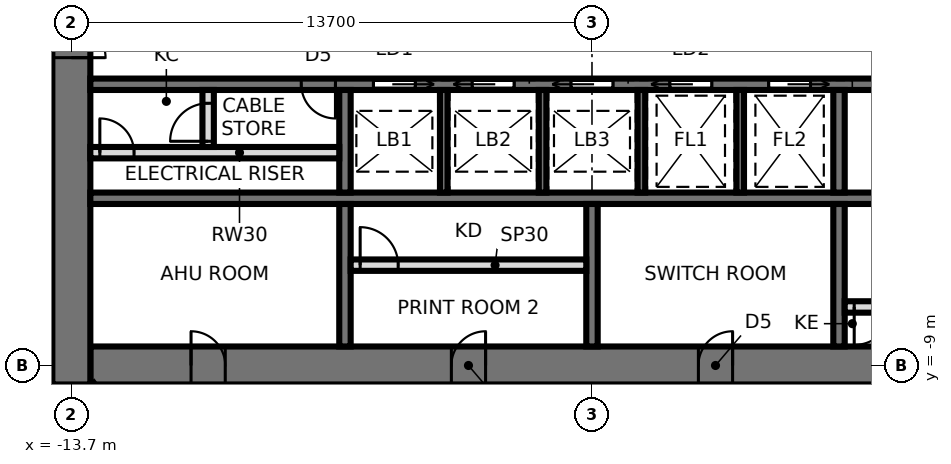
"""IFC4 building model, lengths in metres.
Left out: names, types, materials, properties, quantities, classifications, styles, units other than length and angle.
Written with IfcOpenShell. Run it as: python <this file> out.ifc"""

import sys

from ifc_helpers import new_model, si_unit, direction, frame, frame_2d, origin, place, context, subcontext, project, spatial, rectangle, extrude, element, fill, save


model = new_model("IFC4")
c1 = context("Model", 3, precision=1e-05, world=origin(), true_north=direction((0.0, 1.0)))
c2 = subcontext(c1, "Body", "Model", "MODEL_VIEW")
j1 = project(units=[si_unit("LENGTHUNIT", "METRE"), si_unit("PLANEANGLEUNIT", "RADIAN")], contexts=[c1])
p1 = place(None, origin())
s1 = spatial("IfcSite", under=j1, at=p1, CompositionType="ELEMENT")
p2 = place(p1, origin())
s2 = spatial("IfcBuilding", under=s1, at=p2, CompositionType="ELEMENT")
p3 = place(p2, frame((0.0, 0.0, 135.3)))
s3 = spatial("IfcBuildingStorey", under=s2, at=p3, CompositionType="ELEMENT", Elevation=135.3)
p4 = place(p3, frame((-13.2, -9.0, 0.0), z_axis=(0.0, 0.0, 1.0), x_axis=(1.0, 0.0, 0.0)))
e1 = element("IfcWall", 1, at=p4, inside=s3, PredefinedType="SHEAR", context=c2, shape_type="SweptSolid", body=[
    extrude(rectangle(XDim=26.4, YDim=1.0, at=frame_2d((13.2, 0.0))), origin(), (0.0, 0.0, 1.0), 3.9),
])
p5 = place(p4, frame((2.65, 0.0, 0.0)))
e2 = element("IfcOpeningElement", 2, at=p5, cuts=e1, PredefinedType="OPENING", context=c2, shape_type="SweptSolid", body=[
    extrude(rectangle(XDim=0.9, YDim=2.1, at=frame_2d((0.45, 1.05))), frame((0.0, 0.51, 0.0), z_axis=(0.0, -1.0, 0.0), x_axis=(1.0, 0.0, 0.0)), (0.0, 0.0, 1.0), 1.02),
])
p6 = place(p4, frame((9.5, 0.0, 0.0)))
e3 = element("IfcOpeningElement", 3, at=p6, cuts=e1, PredefinedType="OPENING", context=c2, shape_type="SweptSolid", body=[
    extrude(rectangle(XDim=0.9, YDim=2.1, at=frame_2d((0.45, 1.05))), frame((0.0, 0.51, 0.0), z_axis=(0.0, -1.0, 0.0), x_axis=(1.0, 0.0, 0.0)), (0.0, 0.0, 1.0), 1.02),
])
p7 = place(p4, frame((16.0, 0.0, 0.0)))
e4 = element("IfcOpeningElement", 4, at=p7, cuts=e1, PredefinedType="OPENING", context=c2, shape_type="SweptSolid", body=[
    extrude(rectangle(XDim=0.9, YDim=2.1, at=frame_2d((0.45, 1.05))), frame((0.0, 0.51, 0.0), z_axis=(0.0, -1.0, 0.0), x_axis=(1.0, 0.0, 0.0)), (0.0, 0.0, 1.0), 1.02),
])
p8 = place(p4, frame((22.85, 0.0, 0.0)))
e5 = element("IfcOpeningElement", 5, at=p8, cuts=e1, PredefinedType="OPENING", context=c2, shape_type="SweptSolid", body=[
    extrude(rectangle(XDim=0.9, YDim=2.1, at=frame_2d((0.45, 1.05))), frame((0.0, 0.51, 0.0), z_axis=(0.0, -1.0, 0.0), x_axis=(1.0, 0.0, 0.0)), (0.0, 0.0, 1.0), 1.02),
])
p9 = place(p3, frame((-13.7, 9.5, 0.0), z_axis=(0.0, 0.0, 1.0), x_axis=(0.0, -1.0, 0.0)))
e6 = element("IfcWall", 6, at=p9, inside=s3, PredefinedType="SHEAR", context=c2, shape_type="SweptSolid", body=[
    extrude(rectangle(XDim=19.0, YDim=1.0, at=frame_2d((9.5, 0.0))), origin(), (0.0, 0.0, 1.0), 3.9),
])
p10 = place(p9, frame((8.6, 0.0, 0.0)))
e7 = element("IfcOpeningElement", 7, at=p10, cuts=e6, PredefinedType="OPENING", context=c2, shape_type="SweptSolid", body=[
    extrude(rectangle(XDim=1.8, YDim=2.4, at=frame_2d((0.9, 1.2))), frame((0.0, 0.51, 0.0), z_axis=(0.0, -1.0, 0.0), x_axis=(1.0, 0.0, 0.0)), (0.0, 0.0, 1.0), 1.02),
])
p11 = place(p3, frame((-13.2, -1.6, 0.0), z_axis=(0.0, 0.0, 1.0), x_axis=(1.0, 0.0, 0.0)))
e8 = element("IfcWall", 8, at=p11, inside=s3, PredefinedType="SHEAR", context=c2, shape_type="SweptSolid", body=[
    extrude(rectangle(XDim=26.4, YDim=0.3, at=frame_2d((13.2, 0.0))), origin(), (0.0, 0.0, 1.0), 3.9),
])
p12 = place(p11, frame((25.15, 0.0, 0.0)))
e9 = element("IfcOpeningElement", 9, at=p12, cuts=e8, PredefinedType="OPENING", context=c2, shape_type="SweptSolid", body=[
    extrude(rectangle(XDim=1.0, YDim=2.1, at=frame_2d((0.5, 1.05))), frame((0.0, 0.16, 0.0), z_axis=(0.0, -1.0, 0.0), x_axis=(1.0, 0.0, 0.0)), (0.0, 0.0, 1.0), 0.32),
])
p13 = place(p11, frame((7.45, 0.0, 0.0)))
e10 = element("IfcOpeningElement", 10, at=p13, cuts=e8, PredefinedType="OPENING", context=c2, shape_type="SweptSolid", body=[
    extrude(rectangle(XDim=1.1, YDim=2.3, at=frame_2d((0.55, 1.15))), frame((0.0, 0.16, 0.0), z_axis=(0.0, -1.0, 0.0), x_axis=(1.0, 0.0, 0.0)), (0.0, 0.0, 1.0), 0.32),
])
p14 = place(p11, frame((10.05, 0.0, 0.0)))
e11 = element("IfcOpeningElement", 11, at=p14, cuts=e8, PredefinedType="OPENING", context=c2, shape_type="SweptSolid", body=[
    extrude(rectangle(XDim=1.1, YDim=2.3, at=frame_2d((0.55, 1.15))), frame((0.0, 0.16, 0.0), z_axis=(0.0, -1.0, 0.0), x_axis=(1.0, 0.0, 0.0)), (0.0, 0.0, 1.0), 0.32),
])
p15 = place(p11, frame((12.65, 0.0, 0.0)))
e12 = element("IfcOpeningElement", 12, at=p15, cuts=e8, PredefinedType="OPENING", context=c2, shape_type="SweptSolid", body=[
    extrude(rectangle(XDim=1.1, YDim=2.3, at=frame_2d((0.55, 1.15))), frame((0.0, 0.16, 0.0), z_axis=(0.0, -1.0, 0.0), x_axis=(1.0, 0.0, 0.0)), (0.0, 0.0, 1.0), 0.32),
])
p16 = place(p11, frame((15.25, 0.0, 0.0)))
e13 = element("IfcOpeningElement", 13, at=p16, cuts=e8, PredefinedType="OPENING", context=c2, shape_type="SweptSolid", body=[
    extrude(rectangle(XDim=1.1, YDim=2.3, at=frame_2d((0.55, 1.15))), frame((0.0, 0.16, 0.0), z_axis=(0.0, -1.0, 0.0), x_axis=(1.0, 0.0, 0.0)), (0.0, 0.0, 1.0), 0.32),
])
p17 = place(p11, frame((17.85, 0.0, 0.0)))
e14 = element("IfcOpeningElement", 14, at=p17, cuts=e8, PredefinedType="OPENING", context=c2, shape_type="SweptSolid", body=[
    extrude(rectangle(XDim=1.1, YDim=2.3, at=frame_2d((0.55, 1.15))), frame((0.0, 0.16, 0.0), z_axis=(0.0, -1.0, 0.0), x_axis=(1.0, 0.0, 0.0)), (0.0, 0.0, 1.0), 0.32),
])
p18 = place(p11, frame((5.55, 0.0, 0.0)))
e15 = element("IfcOpeningElement", 15, at=p18, cuts=e8, PredefinedType="OPENING", context=c2, shape_type="SweptSolid", body=[
    extrude(rectangle(XDim=0.9, YDim=2.1, at=frame_2d((0.45, 1.05))), frame((0.0, 0.16, 0.0), z_axis=(0.0, -1.0, 0.0), x_axis=(1.0, 0.0, 0.0)), (0.0, 0.0, 1.0), 0.32),
])
p19 = place(p3, frame((-13.2, -4.6, 0.0), z_axis=(0.0, 0.0, 1.0), x_axis=(1.0, 0.0, 0.0)))
e16 = element("IfcWall", 16, at=p19, inside=s3, PredefinedType="SHEAR", context=c2, shape_type="SweptSolid", body=[
    extrude(rectangle(XDim=26.4, YDim=0.3, at=frame_2d((13.2, 0.0))), origin(), (0.0, 0.0, 1.0), 3.9),
])
p20 = place(p3, frame((-6.5, -1.75, 0.0), z_axis=(0.0, 0.0, 1.0), x_axis=(0.0, -1.0, 0.0)))
e17 = element("IfcWall", 17, at=p20, inside=s3, PredefinedType="SHEAR", context=c2, shape_type="SweptSolid", body=[
    extrude(rectangle(XDim=2.7, YDim=0.3, at=frame_2d((1.35, 0.0))), origin(), (0.0, 0.0, 1.0), 3.9),
])
p21 = place(p3, frame((-6.5, -4.75, 0.0), z_axis=(0.0, 0.0, 1.0), x_axis=(0.0, -1.0, 0.0)))
e18 = element("IfcWall", 18, at=p21, inside=s3, PredefinedType="SHEAR", context=c2, shape_type="SweptSolid", body=[
    extrude(rectangle(XDim=3.75, YDim=0.3, at=frame_2d((1.875, 0.0))), origin(), (0.0, 0.0, 1.0), 3.9),
])
p22 = place(p3, frame((6.5, -1.75, 0.0), z_axis=(0.0, 0.0, 1.0), x_axis=(0.0, -1.0, 0.0)))
e19 = element("IfcWall", 19, at=p22, inside=s3, PredefinedType="SHEAR", context=c2, shape_type="SweptSolid", body=[
    extrude(rectangle(XDim=2.7, YDim=0.3, at=frame_2d((1.35, 0.0))), origin(), (0.0, 0.0, 1.0), 3.9),
])
p23 = place(p3, frame((6.5, -4.75, 0.0), z_axis=(0.0, 0.0, 1.0), x_axis=(0.0, -1.0, 0.0)))
e20 = element("IfcWall", 20, at=p23, inside=s3, PredefinedType="SHEAR", context=c2, shape_type="SweptSolid", body=[
    extrude(rectangle(XDim=3.75, YDim=0.3, at=frame_2d((1.875, 0.0))), origin(), (0.0, 0.0, 1.0), 3.9),
])
for number, where, z_axis, x_axis in (
    (21, (-3.9, -1.75, 0.0), (0.0, 0.0, 1.0), (0.0, -1.0, 0.0)),
    (22, (-1.3, -1.75, 0.0), (0.0, 0.0, 1.0), (0.0, -1.0, 0.0)),
    (23, (1.3, -1.75, 0.0), (0.0, 0.0, 1.0), (0.0, -1.0, 0.0)),
    (24, (3.9, -1.75, 0.0), (0.0, 0.0, 1.0), (0.0, -1.0, 0.0)),
):
    element("IfcWall", number, at=place(p3, frame(where, z_axis=z_axis, x_axis=x_axis)), inside=s3, PredefinedType="SHEAR", context=c2, shape_type="SweptSolid", body=[
        extrude(rectangle(XDim=2.7, YDim=0.2, at=frame_2d((1.35, 0.0))), origin(), (0.0, 0.0, 1.0), 3.9),
    ])
p24 = place(p3, frame((0.0, -4.75, 0.0), z_axis=(0.0, 0.0, 1.0), x_axis=(0.0, -1.0, 0.0)))
e25 = element("IfcWall", 25, at=p24, inside=s3, PredefinedType="SHEAR", context=c2, shape_type="SweptSolid", body=[
    extrude(rectangle(XDim=3.75, YDim=0.3, at=frame_2d((1.875, 0.0))), origin(), (0.0, 0.0, 1.0), 3.9),
])
p25 = place(p3, frame((-6.35, -6.36, 0.0), z_axis=(0.0, 0.0, 1.0), x_axis=(1.0, 0.0, 0.0)))
e26 = element("IfcWall", 26, at=p25, inside=s3, PredefinedType="PARTITIONING", context=c2, shape_type="SweptSolid", body=[
    extrude(rectangle(XDim=6.2, YDim=0.3, at=frame_2d((3.1, 0.0))), origin(), (0.0, 0.0, 1.0), 3.74),
])
p26 = place(p25, frame((0.25, 0.0, 0.0)))
e27 = element("IfcOpeningElement", 27, at=p26, cuts=e26, PredefinedType="OPENING", context=c2, shape_type="SweptSolid", body=[
    extrude(rectangle(XDim=1.0, YDim=2.4, at=frame_2d((0.5, 1.2))), frame((0.0, 0.16, 0.0), z_axis=(0.0, -1.0, 0.0), x_axis=(1.0, 0.0, 0.0)), (0.0, 0.0, 1.0), 0.32),
])
p27 = place(p3, frame((6.65, -7.46, 0.0), z_axis=(0.0, 0.0, 1.0), x_axis=(1.0, 0.0, 0.0)))
e28 = element("IfcWall", 28, at=p27, inside=s3, PredefinedType="PARTITIONING", context=c2, shape_type="SweptSolid", body=[
    extrude(rectangle(XDim=6.55, YDim=0.3, at=frame_2d((3.275, 0.0))), origin(), (0.0, 0.0, 1.0), 3.74),
])
p28 = place(p27, frame((0.25, 0.0, 0.0)))
e29 = element("IfcOpeningElement", 29, at=p28, cuts=e28, PredefinedType="OPENING", context=c2, shape_type="SweptSolid", body=[
    extrude(rectangle(XDim=1.0, YDim=2.4, at=frame_2d((0.5, 1.2))), frame((0.0, 0.16, 0.0), z_axis=(0.0, -1.0, 0.0), x_axis=(1.0, 0.0, 0.0)), (0.0, 0.0, 1.0), 0.32),
])
p29 = place(p3, frame((-13.2, -3.4, 0.0), z_axis=(0.0, 0.0, 1.0), x_axis=(1.0, 0.0, 0.0)))
e30 = element("IfcWall", 30, at=p29, inside=s3, PredefinedType="SOLIDWALL", context=c2, shape_type="SweptSolid", body=[
    extrude(rectangle(XDim=6.55, YDim=0.3, at=frame_2d((3.275, 0.0))), origin(), (0.0, 0.0, 1.0), 3.74),
])
p30 = place(p29, frame((0.25, 0.0, 0.0)))
e31 = element("IfcOpeningElement", 31, at=p30, cuts=e30, PredefinedType="OPENING", context=c2, shape_type="SweptSolid", body=[
    extrude(rectangle(XDim=0.9, YDim=2.1, at=frame_2d((0.45, 1.05))), frame((0.0, 0.16, 0.0), z_axis=(0.0, -1.0, 0.0), x_axis=(1.0, 0.0, 0.0)), (0.0, 0.0, 1.0), 0.32),
])
p31 = place(p3, frame((-10.1, -3.25, 0.0), z_axis=(0.0, 0.0, 1.0), x_axis=(0.0, 1.0, 0.0)))
e32 = element("IfcWall", 32, at=p31, inside=s3, PredefinedType="PARTITIONING", context=c2, shape_type="SweptSolid", body=[
    extrude(rectangle(XDim=1.5, YDim=0.3, at=frame_2d((0.75, 0.0))), origin(), (0.0, 0.0, 1.0), 3.74),
])
p32 = place(p31, frame((0.15, 0.0, 0.0)))
e33 = element("IfcOpeningElement", 33, at=p32, cuts=e32, PredefinedType="OPENING", context=c2, shape_type="SweptSolid", body=[
    extrude(rectangle(XDim=1.0, YDim=2.4, at=frame_2d((0.5, 1.2))), frame((0.0, 0.16, 0.0), z_axis=(0.0, -1.0, 0.0), x_axis=(1.0, 0.0, 0.0)), (0.0, 0.0, 1.0), 0.32),
])
p33 = place(p3, frame((-13.076, -9.5, 0.0), z_axis=(0.0, 0.0, 1.0), x_axis=(-0.809023630932, -0.587776117747, 0.0)))
e34 = element("IfcWall", 34, at=p33, inside=s3, PredefinedType="PARTITIONING", context=c2, shape_type="SweptSolid", body=[
    extrude(rectangle(XDim=7.157, YDim=0.12, at=frame_2d((3.579, 0.0))), origin(), (0.0, 0.0, 1.0), 2.94),
])
p34 = place(p33, frame((2.202, 0.0, 0.0)))
e35 = element("IfcOpeningElement", 35, at=p34, cuts=e34, PredefinedType="OPENING", context=c2, shape_type="SweptSolid", body=[
    extrude(rectangle(XDim=1.0, YDim=2.4, at=frame_2d((0.5, 1.2))), frame((0.0, 0.07, 0.0), z_axis=(0.0, -1.0, 0.0), x_axis=(1.0, 0.0, 0.0)), (0.0, 0.0, 1.0), 0.14),
])
p35 = place(p10, origin())
e36 = element("IfcDoor", 36, at=p35, inside=s3, OperationType="DOUBLE_DOOR_SINGLE_SWING", PredefinedType="DOOR", context=c2, shape_type="SweptSolid", body=[
    extrude(rectangle(XDim=1.72, YDim=2.36, at=frame_2d((0.9, 1.18))), frame((0.0, 0.025, 0.0), z_axis=(0.0, -1.0, 0.0), x_axis=(1.0, 0.0, 0.0)), (0.0, 0.0, 1.0), 0.05),
    extrude(rectangle(XDim=0.04, YDim=2.4, at=frame_2d((0.02, 1.2))), frame((0.0, 0.25, 0.0), z_axis=(0.0, -1.0, 0.0), x_axis=(1.0, 0.0, 0.0)), (0.0, 0.0, 1.0), 0.5),
    extrude(rectangle(XDim=0.04, YDim=2.4, at=frame_2d((1.78, 1.2))), frame((0.0, 0.25, 0.0), z_axis=(0.0, -1.0, 0.0), x_axis=(1.0, 0.0, 0.0)), (0.0, 0.0, 1.0), 0.5),
    extrude(rectangle(XDim=1.72, YDim=0.04, at=frame_2d((0.9, 2.38))), frame((0.0, 0.25, 0.0), z_axis=(0.0, -1.0, 0.0), x_axis=(1.0, 0.0, 0.0)), (0.0, 0.0, 1.0), 0.5),
])
fill(e7, e36)
p36 = place(p13, frame((1.1, 0.0, 0.0), z_axis=(0.0, 0.0, 1.0), x_axis=(-1.0, 0.0, 0.0)))
e37 = element("IfcDoor", 37, at=p36, inside=s3, OperationType="SLIDING_TO_LEFT", PredefinedType="DOOR", context=c2, shape_type="SweptSolid", body=[
    extrude(rectangle(XDim=1.1, YDim=2.3, at=frame_2d((0.55, 1.15))), frame((0.0, 0.025, 0.0), z_axis=(0.0, -1.0, 0.0), x_axis=(1.0, 0.0, 0.0)), (0.0, 0.0, 1.0), 0.05),
])
fill(e10, e37)
p37 = place(p14, frame((1.1, 0.0, 0.0), z_axis=(0.0, 0.0, 1.0), x_axis=(-1.0, 0.0, 0.0)))
e38 = element("IfcDoor", 38, at=p37, inside=s3, OperationType="SLIDING_TO_RIGHT", PredefinedType="DOOR", context=c2, shape_type="SweptSolid", body=[
    extrude(rectangle(XDim=1.1, YDim=2.3, at=frame_2d((0.55, 1.15))), frame((0.0, 0.025, 0.0), z_axis=(0.0, -1.0, 0.0), x_axis=(1.0, 0.0, 0.0)), (0.0, 0.0, 1.0), 0.05),
])
fill(e11, e38)
p38 = place(p15, frame((1.1, 0.0, 0.0), z_axis=(0.0, 0.0, 1.0), x_axis=(-1.0, 0.0, 0.0)))
e39 = element("IfcDoor", 39, at=p38, inside=s3, OperationType="SLIDING_TO_RIGHT", PredefinedType="DOOR", context=c2, shape_type="SweptSolid", body=[
    extrude(rectangle(XDim=1.1, YDim=2.3, at=frame_2d((0.55, 1.15))), frame((0.0, 0.025, 0.0), z_axis=(0.0, -1.0, 0.0), x_axis=(1.0, 0.0, 0.0)), (0.0, 0.0, 1.0), 0.05),
])
fill(e12, e39)
p39 = place(p16, frame((1.1, 0.0, 0.0), z_axis=(0.0, 0.0, 1.0), x_axis=(-1.0, 0.0, 0.0)))
e40 = element("IfcDoor", 40, at=p39, inside=s3, OperationType="SLIDING_TO_RIGHT", PredefinedType="DOOR", context=c2, shape_type="SweptSolid", body=[
    extrude(rectangle(XDim=1.1, YDim=2.3, at=frame_2d((0.55, 1.15))), frame((0.0, 0.025, 0.0), z_axis=(0.0, -1.0, 0.0), x_axis=(1.0, 0.0, 0.0)), (0.0, 0.0, 1.0), 0.05),
])
fill(e13, e40)
p40 = place(p17, frame((1.1, 0.0, 0.0), z_axis=(0.0, 0.0, 1.0), x_axis=(-1.0, 0.0, 0.0)))
e41 = element("IfcDoor", 41, at=p40, inside=s3, OperationType="SLIDING_TO_LEFT", PredefinedType="DOOR", context=c2, shape_type="SweptSolid", body=[
    extrude(rectangle(XDim=1.1, YDim=2.3, at=frame_2d((0.55, 1.15))), frame((0.0, 0.025, 0.0), z_axis=(0.0, -1.0, 0.0), x_axis=(1.0, 0.0, 0.0)), (0.0, 0.0, 1.0), 0.05),
])
fill(e14, e41)
p41 = place(p18, frame((0.9, 0.0, 0.0), z_axis=(0.0, 0.0, 1.0), x_axis=(-1.0, 0.0, 0.0)))
e42 = element("IfcDoor", 42, at=p41, inside=s3, OperationType="SINGLE_SWING_LEFT", PredefinedType="DOOR", context=c2, shape_type="SweptSolid", body=[
    extrude(rectangle(XDim=0.9, YDim=2.1, at=frame_2d((0.45, 1.05))), frame((0.0, 0.025, 0.0), z_axis=(0.0, -1.0, 0.0), x_axis=(1.0, 0.0, 0.0)), (0.0, 0.0, 1.0), 0.05),
])
fill(e15, e42)
p42 = place(p5, origin())
e43 = element("IfcDoor", 43, at=p42, inside=s3, OperationType="SINGLE_SWING_LEFT", PredefinedType="DOOR", context=c2, shape_type="SweptSolid", body=[
    extrude(rectangle(XDim=0.82, YDim=2.06, at=frame_2d((0.45, 1.03))), frame((0.0, 0.025, 0.0), z_axis=(0.0, -1.0, 0.0), x_axis=(1.0, 0.0, 0.0)), (0.0, 0.0, 1.0), 0.05),
    extrude(rectangle(XDim=0.04, YDim=2.1, at=frame_2d((0.02, 1.05))), frame((0.0, 0.25, 0.0), z_axis=(0.0, -1.0, 0.0), x_axis=(1.0, 0.0, 0.0)), (0.0, 0.0, 1.0), 0.5),
    extrude(rectangle(XDim=0.04, YDim=2.1, at=frame_2d((0.88, 1.05))), frame((0.0, 0.25, 0.0), z_axis=(0.0, -1.0, 0.0), x_axis=(1.0, 0.0, 0.0)), (0.0, 0.0, 1.0), 0.5),
    extrude(rectangle(XDim=0.82, YDim=0.04, at=frame_2d((0.45, 2.08))), frame((0.0, 0.25, 0.0), z_axis=(0.0, -1.0, 0.0), x_axis=(1.0, 0.0, 0.0)), (0.0, 0.0, 1.0), 0.5),
])
fill(e2, e43)
p43 = place(p6, origin())
e44 = element("IfcDoor", 44, at=p43, inside=s3, OperationType="SINGLE_SWING_RIGHT", PredefinedType="DOOR", context=c2, shape_type="SweptSolid", body=[
    extrude(rectangle(XDim=0.82, YDim=2.06, at=frame_2d((0.45, 1.03))), frame((0.0, 0.025, 0.0), z_axis=(0.0, -1.0, 0.0), x_axis=(1.0, 0.0, 0.0)), (0.0, 0.0, 1.0), 0.05),
    extrude(rectangle(XDim=0.04, YDim=2.1, at=frame_2d((0.02, 1.05))), frame((0.0, 0.25, 0.0), z_axis=(0.0, -1.0, 0.0), x_axis=(1.0, 0.0, 0.0)), (0.0, 0.0, 1.0), 0.5),
    extrude(rectangle(XDim=0.04, YDim=2.1, at=frame_2d((0.88, 1.05))), frame((0.0, 0.25, 0.0), z_axis=(0.0, -1.0, 0.0), x_axis=(1.0, 0.0, 0.0)), (0.0, 0.0, 1.0), 0.5),
    extrude(rectangle(XDim=0.82, YDim=0.04, at=frame_2d((0.45, 2.08))), frame((0.0, 0.25, 0.0), z_axis=(0.0, -1.0, 0.0), x_axis=(1.0, 0.0, 0.0)), (0.0, 0.0, 1.0), 0.5),
])
fill(e3, e44)
p44 = place(p7, origin())
e45 = element("IfcDoor", 45, at=p44, inside=s3, OperationType="SINGLE_SWING_RIGHT", PredefinedType="DOOR", context=c2, shape_type="SweptSolid", body=[
    extrude(rectangle(XDim=0.82, YDim=2.06, at=frame_2d((0.45, 1.03))), frame((0.0, 0.025, 0.0), z_axis=(0.0, -1.0, 0.0), x_axis=(1.0, 0.0, 0.0)), (0.0, 0.0, 1.0), 0.05),
    extrude(rectangle(XDim=0.04, YDim=2.1, at=frame_2d((0.02, 1.05))), frame((0.0, 0.25, 0.0), z_axis=(0.0, -1.0, 0.0), x_axis=(1.0, 0.0, 0.0)), (0.0, 0.0, 1.0), 0.5),
    extrude(rectangle(XDim=0.04, YDim=2.1, at=frame_2d((0.88, 1.05))), frame((0.0, 0.25, 0.0), z_axis=(0.0, -1.0, 0.0), x_axis=(1.0, 0.0, 0.0)), (0.0, 0.0, 1.0), 0.5),
    extrude(rectangle(XDim=0.82, YDim=0.04, at=frame_2d((0.45, 2.08))), frame((0.0, 0.25, 0.0), z_axis=(0.0, -1.0, 0.0), x_axis=(1.0, 0.0, 0.0)), (0.0, 0.0, 1.0), 0.5),
])
fill(e4, e45)
p45 = place(p26, origin())
e46 = element("IfcDoor", 46, at=p45, inside=s3, OperationType="SINGLE_SWING_LEFT", PredefinedType="DOOR", context=c2, shape_type="SweptSolid", body=[
    extrude(rectangle(XDim=1.0, YDim=2.4, at=frame_2d((0.5, 1.2))), frame((0.0, 0.025, 0.0), z_axis=(0.0, -1.0, 0.0), x_axis=(1.0, 0.0, 0.0)), (0.0, 0.0, 1.0), 0.05),
])
fill(e27, e46)
p46 = place(p28, frame((1.0, 0.0, 0.0), z_axis=(0.0, 0.0, 1.0), x_axis=(-1.0, 0.0, 0.0)))
e47 = element("IfcDoor", 47, at=p46, inside=s3, OperationType="SINGLE_SWING_RIGHT", PredefinedType="DOOR", context=c2, shape_type="SweptSolid", body=[
    extrude(rectangle(XDim=1.0, YDim=2.4, at=frame_2d((0.5, 1.2))), frame((0.0, 0.025, 0.0), z_axis=(0.0, -1.0, 0.0), x_axis=(1.0, 0.0, 0.0)), (0.0, 0.0, 1.0), 0.05),
])
fill(e29, e47)
p47 = place(p30, origin())
e48 = element("IfcDoor", 48, at=p47, inside=s3, OperationType="SINGLE_SWING_LEFT", PredefinedType="DOOR", context=c2, shape_type="SweptSolid", body=[
    extrude(rectangle(XDim=0.9, YDim=2.1, at=frame_2d((0.45, 1.05))), frame((0.0, 0.025, 0.0), z_axis=(0.0, -1.0, 0.0), x_axis=(1.0, 0.0, 0.0)), (0.0, 0.0, 1.0), 0.05),
])
fill(e31, e48)
p48 = place(p32, origin())
e49 = element("IfcDoor", 49, at=p48, inside=s3, OperationType="SINGLE_SWING_LEFT", PredefinedType="DOOR", context=c2, shape_type="SweptSolid", body=[
    extrude(rectangle(XDim=1.0, YDim=2.4, at=frame_2d((0.5, 1.2))), frame((0.0, 0.025, 0.0), z_axis=(0.0, -1.0, 0.0), x_axis=(1.0, 0.0, 0.0)), (0.0, 0.0, 1.0), 0.05),
])
fill(e33, e49)
save(model, sys.argv[1])
